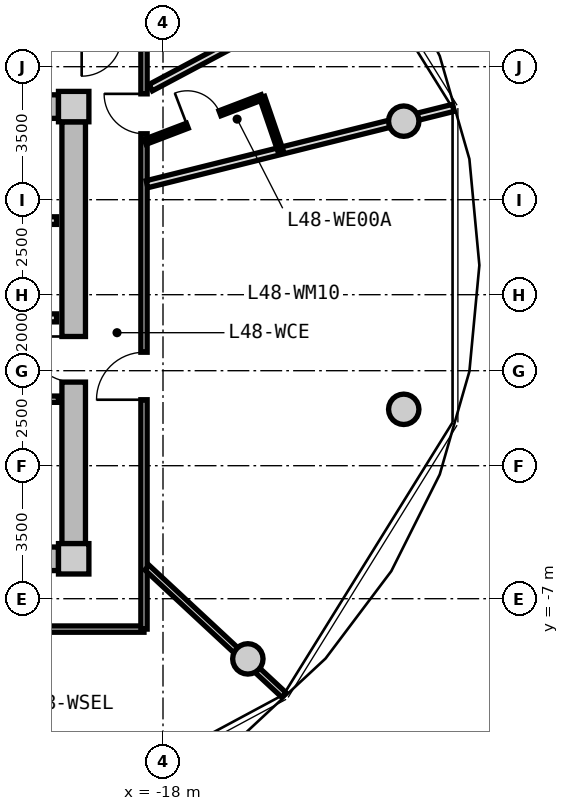
"""IFC4 building model, lengths in metres.
Left out: names, types, materials, properties, quantities, classifications, styles, units other than length and angle.
Written with IfcOpenShell. Run it as: python <this file> out.ifc"""

import sys

from ifc_helpers import new_model, si_unit, direction, frame, frame_2d, origin, origin_2d, place, context, subcontext, project, spatial, rectangle, circle, extrude, source, transform, mapped, element, fill, save


model = new_model("IFC4")
c1 = context("Model", 3, precision=1e-05, world=origin(), true_north=direction((0.0, 1.0)))
c2 = subcontext(c1, "Body", "Model", "MODEL_VIEW")
j1 = project(units=[si_unit("LENGTHUNIT", "METRE"), si_unit("PLANEANGLEUNIT", "RADIAN")], contexts=[c1])
p1 = place(None, origin())
s1 = spatial("IfcSite", under=j1, at=p1, CompositionType="ELEMENT")
p2 = place(p1, origin())
s2 = spatial("IfcBuilding", under=s1, at=p2, CompositionType="ELEMENT")
p3 = place(p2, frame((0.0, 0.0, 155.65)))
s3 = spatial("IfcBuildingStorey", under=s2, at=p3, CompositionType="ELEMENT", Elevation=155.65)
m1 = source(origin(), c2, "Body", "SweptSolid", [
    extrude(rectangle(XDim=0.8, YDim=0.8, at=origin_2d()), origin(), (0.0, 0.0, 1.0), 3.05),
])
for number, where, z_axis, x_axis in (
    (1, (-20.35, -5.95, 0.0), (0.0, 0.0, 1.0), (1.0, 0.0, 0.0)),
    (2, (-20.35, 5.95, 0.0), (0.0, 0.0, 1.0), (1.0, 0.0, 0.0)),
):
    element("IfcColumn", number, at=place(p3, frame(where, z_axis=z_axis, x_axis=x_axis)), inside=s3, PredefinedType="COLUMN", context=c2, shape_type="MappedRepresentation", body=[
        mapped(m1, transform((0.0, 0.0, 0.0), x_axis=(1.0, 0.0, 0.0), y_axis=(0.0, 1.0, 0.0), z_axis=(0.0, 0.0, 1.0), scale=1.0)),
    ])
m2 = source(origin(), c2, "Body", "SweptSolid", [
    extrude(rectangle(XDim=14.5, YDim=0.62, at=frame_2d((7.25, 0.0))), origin(), (0.0, 0.0, 1.0), 2.81),
])
for number, where, z_axis, x_axis in (
    (3, (-35.25, 5.95, 0.0), (0.0, 0.0, 1.0), (1.0, 0.0, 0.0)),
    (4, (-20.75, -5.95, 0.0), (0.0, 0.0, 1.0), (-1.0, 0.0, 0.0)),
):
    element("IfcWall", number, at=place(p3, frame(where, z_axis=z_axis, x_axis=x_axis)), inside=s3, PredefinedType="SHEAR", context=c2, shape_type="MappedRepresentation", body=[
        mapped(m2, transform((0.0, 0.0, 0.0), x_axis=(1.0, 0.0, 0.0), y_axis=(0.0, 1.0, 0.0), z_axis=(0.0, 0.0, 1.0), scale=1.0)),
    ])
m3 = source(origin(), c2, "Body", "SweptSolid", [
    extrude(rectangle(XDim=11.1, YDim=0.62, at=frame_2d((5.55, 0.0))), origin(), (0.0, 0.0, 1.0), 2.81),
])
p4 = place(p3, frame((-20.35, 5.55, 0.0), z_axis=(0.0, 0.0, 1.0), x_axis=(0.0, -1.0, 0.0)))
e5 = element("IfcWall", 5, at=p4, inside=s3, PredefinedType="SHEAR", context=c2, shape_type="MappedRepresentation", body=[
    mapped(m3, transform((0.0, 0.0, 0.0), x_axis=(1.0, 0.0, 0.0), y_axis=(0.0, 1.0, 0.0), z_axis=(0.0, 0.0, 1.0), scale=1.0)),
])
p5 = place(p4, frame((5.65, 0.0, 0.0)))
e6 = element("IfcOpeningElement", 6, at=p5, cuts=e5, PredefinedType="OPENING", context=c2, shape_type="SweptSolid", body=[
    extrude(rectangle(XDim=1.2, YDim=2.15, at=frame_2d((0.6, 1.075))), frame((0.0, 0.32, 0.0), z_axis=(0.0, -1.0, 0.0), x_axis=(1.0, 0.0, 0.0)), (0.0, 0.0, 1.0), 0.64),
])
m4 = source(origin(), c2, "Body", "SweptSolid", [
    extrude(circle(Radius=0.4, at=origin_2d()), origin(), (0.0, 0.0, 1.0), 3.05),
])
for number, where, z_axis, x_axis in (
    (7, (-11.665, 5.567, 0.0), (0.0, 0.0, 1.0), (1.0, 0.0, 0.0)),
    (8, (-15.767, -8.584, 0.0), (0.0, 0.0, 1.0), (1.0, 0.0, 0.0)),
    (9, (-11.665, -2.016, 0.0), (0.0, 0.0, 1.0), (1.0, 0.0, 0.0)),
):
    element("IfcColumn", number, at=place(p3, frame(where, z_axis=z_axis, x_axis=x_axis)), inside=s3, PredefinedType="COLUMN", context=c2, shape_type="MappedRepresentation", body=[
        mapped(m4, transform((0.0, 0.0, 0.0), x_axis=(1.0, 0.0, 0.0), y_axis=(0.0, 1.0, 0.0), z_axis=(0.0, 0.0, 1.0), scale=1.0)),
    ])
m5 = source(origin(), c2, "Body", "SweptSolid", [
    extrude(rectangle(XDim=3.2, YDim=0.2, at=frame_2d((1.6, 0.0))), origin(), (0.0, 0.0, 1.0), 2.795),
])
p6 = place(p3, frame((-24.0, 2.95, 0.0), z_axis=(0.0, 0.0, 1.0), x_axis=(1.0, 0.0, 0.0)))
e10 = element("IfcWall", 10, at=p6, inside=s3, PredefinedType="PARTITIONING", context=c2, shape_type="MappedRepresentation", body=[
    mapped(m5, transform((0.0, 0.0, 0.0), x_axis=(1.0, 0.0, 0.0), y_axis=(0.0, 1.0, 0.0), z_axis=(0.0, 0.0, 1.0), scale=1.0)),
])
m6 = source(origin(), c2, "Body", "SweptSolid", [
    extrude(rectangle(XDim=6.66, YDim=0.21, at=frame_2d((3.33, 0.0))), origin(), (0.0, 0.0, 1.0), 2.795),
])
p7 = place(p3, frame((-27.46, 0.39, 0.0), z_axis=(0.0, 0.0, 1.0), x_axis=(1.0, 0.0, 0.0)))
e11 = element("IfcWall", 11, at=p7, inside=s3, PredefinedType="PARTITIONING", context=c2, shape_type="MappedRepresentation", body=[
    mapped(m6, transform((0.0, 0.0, 0.0), x_axis=(1.0, 0.0, 0.0), y_axis=(0.0, 1.0, 0.0), z_axis=(0.0, 0.0, 1.0), scale=1.0)),
])
p8 = place(p7, frame((1.0, 0.0, 0.0)))
e12 = element("IfcOpeningElement", 12, at=p8, cuts=e11, PredefinedType="OPENING", context=c2, shape_type="SweptSolid", body=[
    extrude(rectangle(XDim=1.2, YDim=2.15, at=frame_2d((0.6, 1.075))), frame((0.0, 0.115, 0.0), z_axis=(0.0, -1.0, 0.0), x_axis=(1.0, 0.0, 0.0)), (0.0, 0.0, 1.0), 0.23),
])
m7 = source(origin(), c2, "Body", "SweptSolid", [
    extrude(rectangle(XDim=2.7, YDim=0.165, at=frame_2d((1.35, 0.0))), origin(), (0.0, 0.0, 1.0), 2.795),
])
p9 = place(p3, frame((-23.45, -1.75, 0.0), z_axis=(0.0, 0.0, 1.0), x_axis=(1.0, 0.0, 0.0)))
e13 = element("IfcWall", 13, at=p9, inside=s3, PredefinedType="PARTITIONING", context=c2, shape_type="MappedRepresentation", body=[
    mapped(m7, transform((0.0, 0.0, 0.0), x_axis=(1.0, 0.0, 0.0), y_axis=(0.0, 1.0, 0.0), z_axis=(0.0, 0.0, 1.0), scale=1.0)),
])
p10 = place(p9, frame((0.85, 0.0, 0.0)))
e14 = element("IfcOpeningElement", 14, at=p10, cuts=e13, PredefinedType="OPENING", context=c2, shape_type="SweptSolid", body=[
    extrude(rectangle(XDim=0.925, YDim=2.1, at=frame_2d((0.462, 1.05))), frame((0.0, 0.093, 0.0), z_axis=(0.0, -1.0, 0.0), x_axis=(1.0, 0.0, 0.0)), (0.0, 0.0, 1.0), 0.185),
])
m8 = source(origin(), c2, "Body", "SweptSolid", [
    extrude(rectangle(XDim=8.6, YDim=0.165, at=frame_2d((4.3, 0.0))), origin(), (0.0, 0.0, 1.0), 2.795),
])
p11 = place(p3, frame((-18.5, -7.8, 0.0), z_axis=(0.0, 0.0, 1.0), x_axis=(-1.0, 0.0, 0.0)))
e15 = element("IfcWall", 15, at=p11, inside=s3, PredefinedType="PARTITIONING", context=c2, shape_type="MappedRepresentation", body=[
    mapped(m8, transform((0.0, 0.0, 0.0), x_axis=(1.0, 0.0, 0.0), y_axis=(0.0, 1.0, 0.0), z_axis=(0.0, 0.0, 1.0), scale=1.0)),
])
p12 = place(p11, frame((3.359, 0.0, 0.0)))
e16 = element("IfcOpeningElement", 16, at=p12, cuts=e15, PredefinedType="OPENING", context=c2, shape_type="SweptSolid", body=[
    extrude(rectangle(XDim=1.05, YDim=2.15, at=frame_2d((0.525, 1.075))), frame((0.0, 0.093, 0.0), z_axis=(0.0, -1.0, 0.0), x_axis=(1.0, 0.0, 0.0)), (0.0, 0.0, 1.0), 0.185),
])
m9 = source(origin(), c2, "Body", "SweptSolid", [
    extrude(rectangle(XDim=15.6, YDim=0.165, at=frame_2d((7.8, 0.0))), origin(), (0.0, 0.0, 1.0), 2.795),
])
p13 = place(p3, frame((-18.5, 7.8, 0.0), z_axis=(0.0, 0.0, 1.0), x_axis=(0.0, -1.0, 0.0)))
e17 = element("IfcWall", 17, at=p13, inside=s3, PredefinedType="PARTITIONING", context=c2, shape_type="MappedRepresentation", body=[
    mapped(m9, transform((0.0, 0.0, 0.0), x_axis=(1.0, 0.0, 0.0), y_axis=(0.0, 1.0, 0.0), z_axis=(0.0, 0.0, 1.0), scale=1.0)),
])
p14 = place(p13, frame((8.314, 0.0, 0.0)))
e18 = element("IfcOpeningElement", 18, at=p14, cuts=e17, PredefinedType="OPENING", context=c2, shape_type="SweptSolid", body=[
    extrude(rectangle(XDim=1.25, YDim=2.2, at=frame_2d((0.625, 1.1))), frame((0.0, 0.093, 0.0), z_axis=(0.0, -1.0, 0.0), x_axis=(1.0, 0.0, 0.0)), (0.0, 0.0, 1.0), 0.185),
])
p15 = place(p13, frame((1.515, 0.0, 0.0)))
e19 = element("IfcOpeningElement", 19, at=p15, cuts=e17, PredefinedType="OPENING", context=c2, shape_type="SweptSolid", body=[
    extrude(rectangle(XDim=1.05, YDim=2.15, at=frame_2d((0.525, 1.075))), frame((0.0, 0.093, 0.0), z_axis=(0.0, -1.0, 0.0), x_axis=(1.0, 0.0, 0.0)), (0.0, 0.0, 1.0), 0.185),
])
m10 = source(origin(), c2, "Body", "SweptSolid", [
    extrude(rectangle(XDim=4.927, YDim=0.165, at=frame_2d((2.463, 0.0))), origin(), (0.0, 0.0, 1.0), 2.345),
])
p16 = place(p3, frame((-18.42, -6.183, 0.0), z_axis=(0.0, 0.0, 1.0), x_axis=(0.732191335987, -0.681098999783, 0.0)))
e20 = element("IfcWall", 20, at=p16, inside=s3, PredefinedType="PARTITIONING", context=c2, shape_type="MappedRepresentation", body=[
    mapped(m10, transform((0.0, 0.0, 0.0), x_axis=(1.0, 0.0, 0.0), y_axis=(0.0, 1.0, 0.0), z_axis=(0.0, 0.0, 1.0), scale=1.0)),
])
m11 = source(origin(), c2, "Body", "SweptSolid", [
    extrude(rectangle(XDim=8.305, YDim=0.19, at=frame_2d((4.153, 0.0))), origin(), (0.0, 0.0, 1.0), 2.345),
])
p17 = place(p3, frame((-18.42, 3.908, 0.0), z_axis=(0.0, 0.0, 1.0), x_axis=(0.970309994378, 0.241864662175, 0.0)))
e21 = element("IfcWall", 21, at=p17, inside=s3, PredefinedType="PARTITIONING", context=c2, shape_type="MappedRepresentation", body=[
    mapped(m11, transform((0.0, 0.0, 0.0), x_axis=(1.0, 0.0, 0.0), y_axis=(0.0, 1.0, 0.0), z_axis=(0.0, 0.0, 1.0), scale=1.0)),
])
m12 = source(origin(), c2, "Body", "SweptSolid", [
    extrude(rectangle(XDim=6.499, YDim=0.19, at=frame_2d((3.25, 0.0))), origin(), (0.0, 0.0, 1.0), 2.795),
])
p18 = place(p3, frame((-18.324, 6.449, 0.0), z_axis=(0.0, 0.0, 1.0), x_axis=(0.882715595921, 0.469907625729, 0.0)))
e22 = element("IfcWall", 22, at=p18, inside=s3, PredefinedType="PARTITIONING", context=c2, shape_type="MappedRepresentation", body=[
    mapped(m12, transform((0.0, 0.0, 0.0), x_axis=(1.0, 0.0, 0.0), y_axis=(0.0, 1.0, 0.0), z_axis=(0.0, 0.0, 1.0), scale=1.0)),
])
m13 = source(origin(), c2, "Body", "SweptSolid", [
    extrude(rectangle(XDim=3.295, YDim=0.14, at=frame_2d((1.647, 0.0))), origin(), (0.0, 0.0, 1.0), 2.795),
])
p19 = place(p3, frame((-18.47, 5.023, 0.0), z_axis=(0.0, 0.0, 1.0), x_axis=(0.934202224769, 0.356743890258, 0.0)))
e23 = element("IfcWall", 23, at=p19, inside=s3, PredefinedType="PARTITIONING", context=c2, shape_type="MappedRepresentation", body=[
    mapped(m13, transform((0.0, 0.0, 0.0), x_axis=(1.0, 0.0, 0.0), y_axis=(0.0, 1.0, 0.0), z_axis=(0.0, 0.0, 1.0), scale=1.0)),
])
p20 = place(p19, frame((1.188, 0.0, 0.0)))
e24 = element("IfcOpeningElement", 24, at=p20, cuts=e23, PredefinedType="OPENING", context=c2, shape_type="SweptSolid", body=[
    extrude(rectangle(XDim=0.92, YDim=2.1, at=frame_2d((0.46, 1.05))), frame((0.0, 0.08, 0.0), z_axis=(0.0, -1.0, 0.0), x_axis=(1.0, 0.0, 0.0)), (0.0, 0.0, 1.0), 0.16),
])
m14 = source(origin(), c2, "Body", "SweptSolid", [
    extrude(rectangle(XDim=1.479, YDim=0.14, at=frame_2d((0.739, 0.0))), origin(), (0.0, 0.0, 1.0), 2.795),
])
p21 = place(p3, frame((-15.392, 6.198, 0.0), z_axis=(0.0, 0.0, 1.0), x_axis=(0.324438293903, -0.945906862989, 0.0)))
e25 = element("IfcWall", 25, at=p21, inside=s3, PredefinedType="PARTITIONING", context=c2, shape_type="MappedRepresentation", body=[
    mapped(m14, transform((0.0, 0.0, 0.0), x_axis=(1.0, 0.0, 0.0), y_axis=(0.0, 1.0, 0.0), z_axis=(0.0, 0.0, 1.0), scale=1.0)),
])
m15 = source(origin(), c2, "Body", "SweptSolid", [
    extrude(rectangle(XDim=1.2, YDim=2.15, at=frame_2d((0.6, 1.075))), frame((0.0, 0.025, 0.0), z_axis=(0.0, -1.0, 0.0), x_axis=(1.0, 0.0, 0.0)), (0.0, 0.0, 1.0), 0.05),
])
p22 = place(p5, frame((1.2, 0.0, 0.0), z_axis=(0.0, 0.0, 1.0), x_axis=(-1.0, 0.0, 0.0)))
e26 = element("IfcDoor", 26, at=p22, inside=s3, OperationType="SINGLE_SWING_RIGHT", PredefinedType="DOOR", context=c2, shape_type="MappedRepresentation", body=[
    mapped(m15, transform((0.0, 0.0, 0.0), x_axis=(1.0, 0.0, 0.0), y_axis=(0.0, 1.0, 0.0), z_axis=(0.0, 0.0, 1.0), scale=1.0)),
])
fill(e6, e26)
m16 = source(origin(), c2, "Body", "SweptSolid", [
    extrude(rectangle(XDim=1.25, YDim=2.2, at=frame_2d((0.625, 1.1))), frame((0.0, 0.025, 0.0), z_axis=(0.0, -1.0, 0.0), x_axis=(1.0, 0.0, 0.0)), (0.0, 0.0, 1.0), 0.05),
])
p23 = place(p14, frame((1.25, 0.0, 0.0), z_axis=(0.0, 0.0, 1.0), x_axis=(-1.0, 0.0, 0.0)))
e27 = element("IfcDoor", 27, at=p23, inside=s3, OperationType="SINGLE_SWING_LEFT", PredefinedType="DOOR", context=c2, shape_type="MappedRepresentation", body=[
    mapped(m16, transform((0.0, 0.0, 0.0), x_axis=(1.0, 0.0, 0.0), y_axis=(0.0, 1.0, 0.0), z_axis=(0.0, 0.0, 1.0), scale=1.0)),
])
fill(e18, e27)
m17 = source(origin(), c2, "Body", "SweptSolid", [
    extrude(rectangle(XDim=1.05, YDim=2.15, at=frame_2d((0.525, 1.075))), frame((0.0, 0.025, 0.0), z_axis=(0.0, -1.0, 0.0), x_axis=(1.0, 0.0, 0.0)), (0.0, 0.0, 1.0), 0.05),
])
p24 = place(p15, frame((1.05, 0.0, 0.0), z_axis=(0.0, 0.0, 1.0), x_axis=(-1.0, 0.0, 0.0)))
e28 = element("IfcDoor", 28, at=p24, inside=s3, OperationType="SINGLE_SWING_RIGHT", PredefinedType="DOOR", context=c2, shape_type="MappedRepresentation", body=[
    mapped(m17, transform((0.0, 0.0, 0.0), x_axis=(1.0, 0.0, 0.0), y_axis=(0.0, 1.0, 0.0), z_axis=(0.0, 0.0, 1.0), scale=1.0)),
])
fill(e19, e28)
m18 = source(origin(), c2, "Body", "SweptSolid", [
    extrude(rectangle(XDim=0.92, YDim=2.1, at=frame_2d((0.46, 1.05))), frame((0.0, 0.025, 0.0), z_axis=(0.0, -1.0, 0.0), x_axis=(1.0, 0.0, 0.0)), (0.0, 0.0, 1.0), 0.05),
])
p25 = place(p20, origin())
e29 = element("IfcDoor", 29, at=p25, inside=s3, OperationType="SINGLE_SWING_LEFT", PredefinedType="DOOR", context=c2, shape_type="MappedRepresentation", body=[
    mapped(m18, transform((0.0, 0.0, 0.0), x_axis=(1.0, 0.0, 0.0), y_axis=(0.0, 1.0, 0.0), z_axis=(0.0, 0.0, 1.0), scale=1.0)),
])
fill(e24, e29)
save(model, sys.argv[1])
